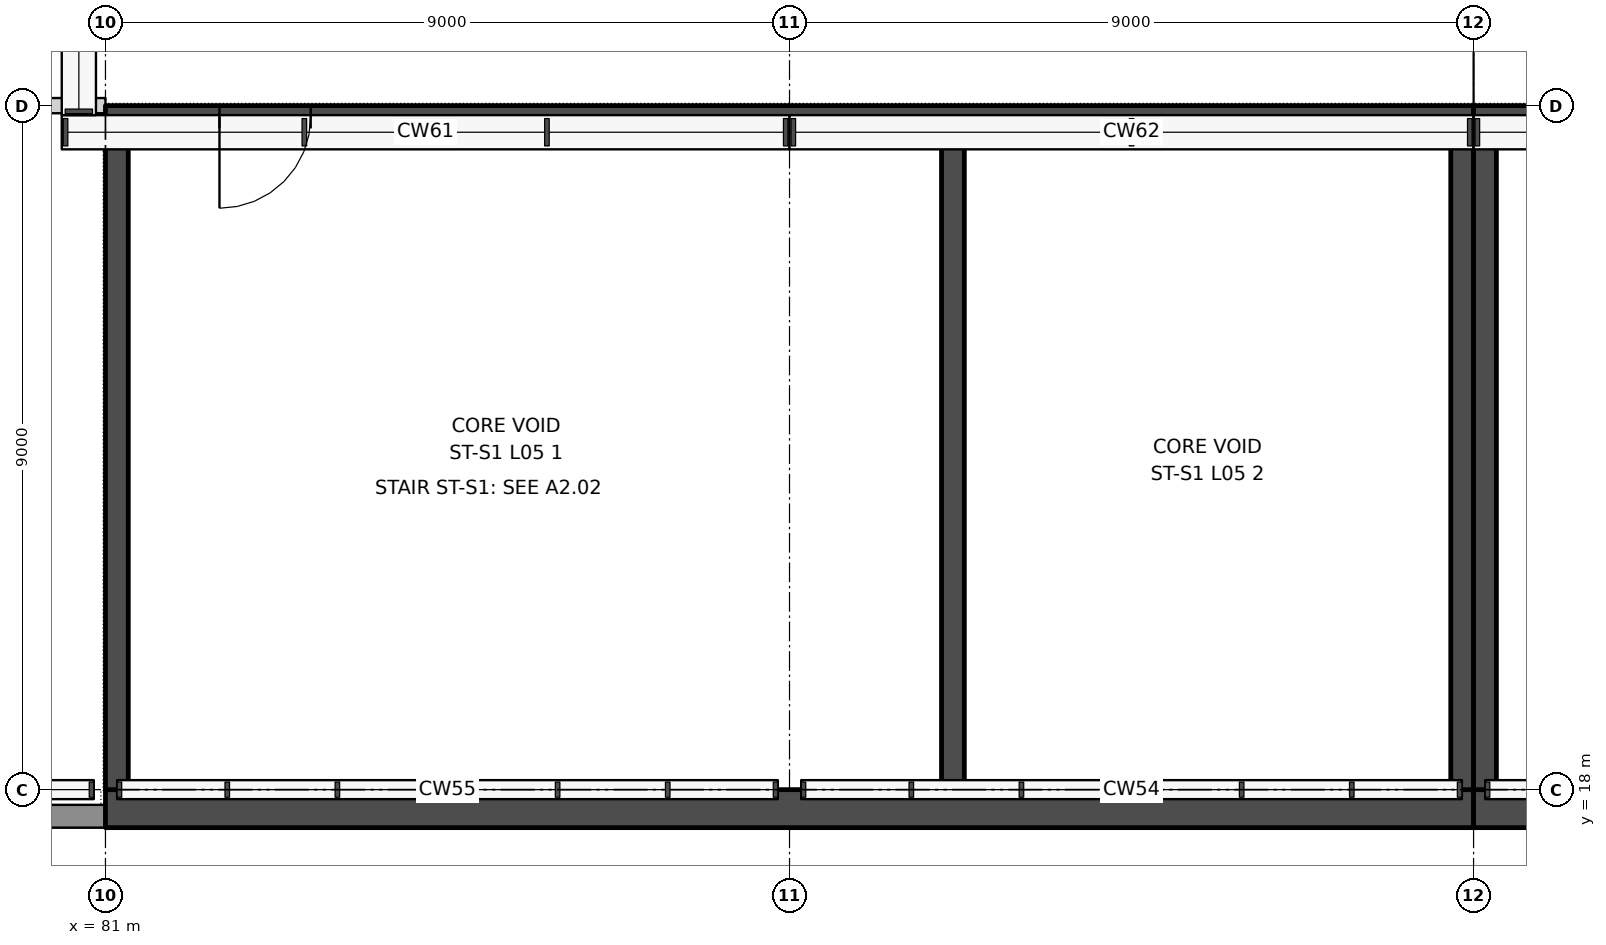
"""IFC4 building model, lengths in metres.
Left out: names, types, materials, properties, quantities, classifications, styles, units other than length and angle.
Written with IfcOpenShell. Run it as: python <this file> out.ifc"""

import sys

from ifc_helpers import new_model, si_unit, direction, frame, frame_2d, origin, place, context, subcontext, project, spatial, rectangle, extrude, element, fill, save


model = new_model("IFC4")
c1 = context("Model", 3, precision=1e-05, world=origin(), true_north=direction((0.0, 1.0)))
c2 = subcontext(c1, "Body", "Model", "MODEL_VIEW")
j1 = project(units=[si_unit("LENGTHUNIT", "METRE"), si_unit("PLANEANGLEUNIT", "RADIAN")], contexts=[c1])
p1 = place(None, origin())
s1 = spatial("IfcSite", under=j1, at=p1, CompositionType="ELEMENT")
p2 = place(p1, origin())
s2 = spatial("IfcBuilding", under=s1, at=p2, CompositionType="ELEMENT")
p3 = place(p2, frame((0.0, 0.0, 33.5)))
s3 = spatial("IfcBuildingStorey", under=s2, at=p3, CompositionType="ELEMENT", Elevation=33.5)
p4 = place(p3, frame((72.0, 27.0, 0.0), z_axis=(0.0, 0.0, 1.0), x_axis=(1.0, 0.0, 0.0)))
e1 = element("IfcWall", 1, at=p4, inside=s3, PredefinedType="PARTITIONING", context=c2, shape_type="SweptSolid", body=[
    extrude(rectangle(XDim=9.0, YDim=0.2, at=frame_2d((4.5, 0.0))), origin(), (0.0, 0.0, 1.0), 4.0),
])
p5 = place(p4, frame((3.6, 0.0, 0.0)))
e2 = element("IfcOpeningElement", 2, at=p5, cuts=e1, PredefinedType="OPENING", context=c2, shape_type="SweptSolid", body=[
    extrude(rectangle(XDim=1.8, YDim=2.1, at=frame_2d((0.9, 1.05))), frame((0.0, 0.11, 0.0), z_axis=(0.0, -1.0, 0.0), x_axis=(1.0, 0.0, 0.0)), (0.0, 0.0, 1.0), 0.22),
])
p6 = place(p3, frame((72.0, 17.65, 0.0), z_axis=(0.0, 0.0, 1.0), x_axis=(1.0, 0.0, 0.0)))
e3 = element("IfcWall", 3, at=p6, inside=s3, PredefinedType="SOLIDWALL", context=c2, shape_type="SweptSolid", body=[
    extrude(rectangle(XDim=9.0, YDim=0.3, at=frame_2d((4.5, 0.0))), origin(), (0.0, 0.0, 1.0), 4.0),
])
p7 = place(p3, frame((81.0, 26.85, 0.0), z_axis=(0.0, 0.0, 1.0), x_axis=(1.0, 0.0, 0.0)))
e4 = element("IfcWall", 4, at=p7, inside=s3, PredefinedType="SHEAR", context=c2, shape_type="SweptSolid", body=[
    extrude(rectangle(XDim=18.0, YDim=0.3, at=frame_2d((9.0, 0.0))), origin(), (0.0, 0.0, 1.0), 4.0),
])
p8 = place(p7, frame((1.5, 0.0, 0.0)))
e5 = element("IfcOpeningElement", 5, at=p8, cuts=e4, PredefinedType="OPENING", context=c2, shape_type="SweptSolid", body=[
    extrude(rectangle(XDim=1.2, YDim=2.1, at=frame_2d((0.6, 1.05))), frame((0.0, 0.16, 0.0), z_axis=(0.0, -1.0, 0.0), x_axis=(1.0, 0.0, 0.0)), (0.0, 0.0, 1.0), 0.32),
])
p9 = place(p3, frame((81.0, 17.75, 0.0), z_axis=(0.0, 0.0, 1.0), x_axis=(1.0, 0.0, 0.0)))
e6 = element("IfcWall", 6, at=p9, inside=s3, PredefinedType="SHEAR", context=c2, shape_type="SweptSolid", body=[
    extrude(rectangle(XDim=18.0, YDim=0.5, at=frame_2d((9.0, 0.0))), origin(), (0.0, 0.0, 1.0), 4.0),
])
for number, where, z_axis, x_axis in (
    (7, (81.15, 26.7, 0.0), (0.0, 0.0, 1.0), (0.0, -1.0, 0.0)),
    (8, (98.85, 26.7, 0.0), (0.0, 0.0, 1.0), (0.0, -1.0, 0.0)),
    (9, (92.15, 26.7, 0.0), (0.0, 0.0, 1.0), (0.0, -1.0, 0.0)),
):
    element("IfcWall", number, at=place(p3, frame(where, z_axis=z_axis, x_axis=x_axis)), inside=s3, PredefinedType="SHEAR", context=c2, shape_type="SweptSolid", body=[
        extrude(rectangle(XDim=8.7, YDim=0.3, at=frame_2d((4.35, 0.0))), origin(), (0.0, 0.0, 1.0), 4.0),
    ])
p10 = place(p3, frame((117.0, 26.85, 0.0), z_axis=(0.0, 0.0, 1.0), x_axis=(-1.0, 0.0, 0.0)))
e10 = element("IfcWall", 10, at=p10, inside=s3, PredefinedType="SHEAR", context=c2, shape_type="SweptSolid", body=[
    extrude(rectangle(XDim=18.0, YDim=0.3, at=frame_2d((9.0, 0.0))), origin(), (0.0, 0.0, 1.0), 4.0),
])
p11 = place(p10, frame((8.6, 0.0, 0.0)))
e11 = element("IfcOpeningElement", 11, at=p11, cuts=e10, PredefinedType="OPENING", context=c2, shape_type="SweptSolid", body=[
    extrude(rectangle(XDim=1.2, YDim=2.1, at=frame_2d((0.6, 1.05))), frame((0.0, 0.16, 0.0), z_axis=(0.0, -1.0, 0.0), x_axis=(1.0, 0.0, 0.0)), (0.0, 0.0, 1.0), 0.32),
])
p12 = place(p3, frame((117.0, 17.75, 0.0), z_axis=(0.0, 0.0, 1.0), x_axis=(-1.0, 0.0, 0.0)))
e12 = element("IfcWall", 12, at=p12, inside=s3, PredefinedType="SHEAR", context=c2, shape_type="SweptSolid", body=[
    extrude(rectangle(XDim=18.0, YDim=0.5, at=frame_2d((9.0, 0.0))), origin(), (0.0, 0.0, 1.0), 4.0),
])
p13 = place(p3, frame((99.15, 26.7, 0.0), z_axis=(0.0, 0.0, 1.0), x_axis=(0.0, -1.0, 0.0)))
e13 = element("IfcWall", 13, at=p13, inside=s3, PredefinedType="SHEAR", context=c2, shape_type="SweptSolid", body=[
    extrude(rectangle(XDim=8.7, YDim=0.3, at=frame_2d((4.35, 0.0))), origin(), (0.0, 0.0, 1.0), 4.0),
])
p14 = place(p8, frame((1.2, 0.0, 0.0), z_axis=(0.0, 0.0, 1.0), x_axis=(-1.0, 0.0, 0.0)))
e14 = element("IfcDoor", 14, at=p14, inside=s3, OperationType="SINGLE_SWING_RIGHT", PredefinedType="DOOR", context=c2, shape_type="SweptSolid", body=[
    extrude(rectangle(XDim=1.2, YDim=2.1, at=frame_2d((0.6, 1.05))), frame((0.0, 0.025, 0.0), z_axis=(0.0, -1.0, 0.0), x_axis=(1.0, 0.0, 0.0)), (0.0, 0.0, 1.0), 0.05),
])
fill(e5, e14)
save(model, sys.argv[1])
